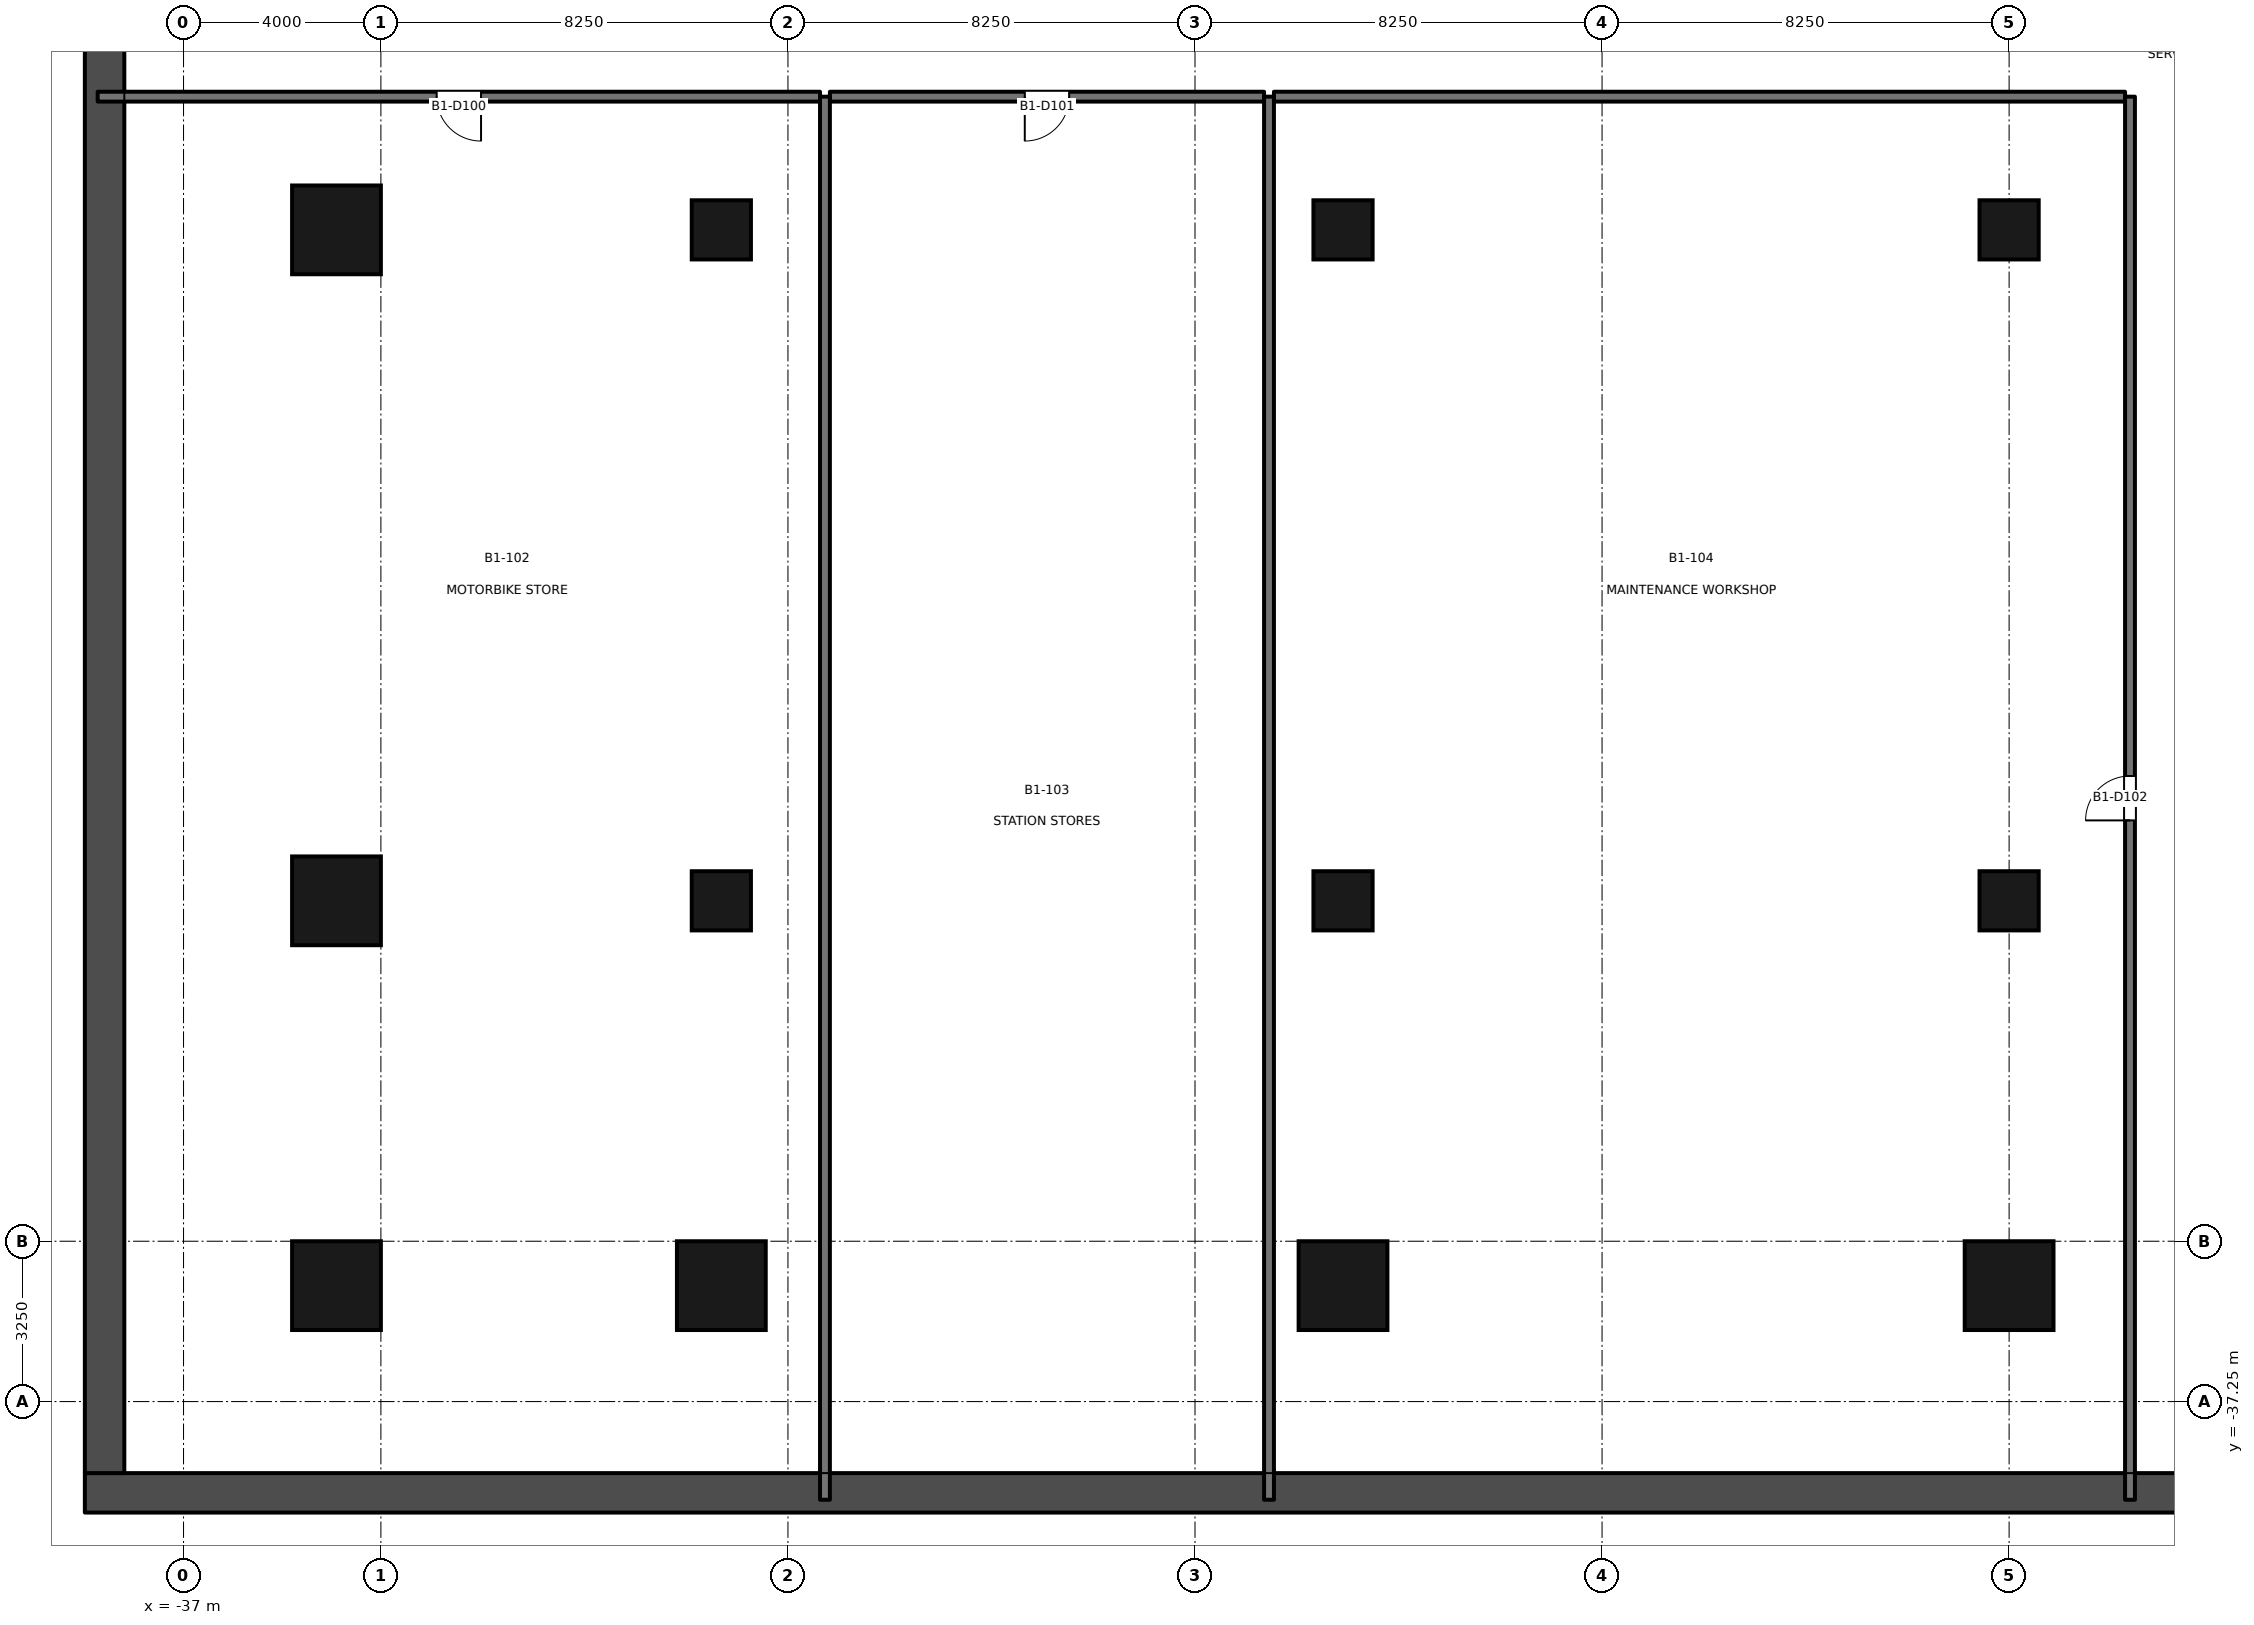
"""IFC4 building model, lengths in metres.
Left out: names, types, materials, properties, quantities, classifications, styles, units other than length and angle.
Written with IfcOpenShell. Run it as: python <this file> out.ifc"""

import sys

from ifc_helpers import new_model, si_unit, direction, frame, frame_2d, origin, origin_2d, place, context, subcontext, project, spatial, rectangle, extrude, element, fill, save


model = new_model("IFC4")
c1 = context("Model", 3, precision=1e-05, world=origin(), true_north=direction((0.0, 1.0)))
c2 = subcontext(c1, "Body", "Model", "MODEL_VIEW")
j1 = project(units=[si_unit("LENGTHUNIT", "METRE"), si_unit("PLANEANGLEUNIT", "RADIAN")], contexts=[c1])
p1 = place(None, origin())
s1 = spatial("IfcSite", under=j1, at=p1, CompositionType="ELEMENT")
p2 = place(p1, origin())
s2 = spatial("IfcBuilding", under=s1, at=p2, CompositionType="ELEMENT")
p3 = place(p2, frame((0.0, 0.0, -5.5)))
s3 = spatial("IfcBuildingStorey", under=s2, at=p3, CompositionType="ELEMENT", Elevation=-5.5)
p4 = place(p3, frame((-39.0, -39.1, -0.2), z_axis=(0.0, 0.0, 1.0), x_axis=(1.0, 0.0, 0.0)))
e1 = element("IfcWall", 1, at=p4, inside=s3, PredefinedType="SOLIDWALL", context=c2, shape_type="SweptSolid", body=[
    extrude(rectangle(XDim=78.0, YDim=0.8, at=frame_2d((39.0, 0.0))), origin(), (0.0, 0.0, 1.0), 5.5),
])
p5 = place(p3, frame((-38.6, -38.7, -0.2), z_axis=(0.0, 0.0, 1.0), x_axis=(0.0, 1.0, 0.0)))
e2 = element("IfcWall", 2, at=p5, inside=s3, PredefinedType="SOLIDWALL", context=c2, shape_type="SweptSolid", body=[
    extrude(rectangle(XDim=51.9, YDim=0.8, at=frame_2d((25.95, 0.0))), origin(), (0.0, 0.0, 1.0), 5.5),
])
for number, where, z_axis, x_axis in (
    (3, (-33.9, -34.9, -0.2), (0.0, 0.0, 1.0), (1.0, 0.0, 0.0)),
    (4, (-26.1, -34.9, -0.2), (0.0, 0.0, 1.0), (1.0, 0.0, 0.0)),
    (5, (-13.5, -34.9, -0.2), (0.0, 0.0, 1.0), (1.0, 0.0, 0.0)),
    (6, (0.0, -34.9, -0.2), (0.0, 0.0, 1.0), (1.0, 0.0, 0.0)),
    (7, (-33.9, -27.1, -0.2), (0.0, 0.0, 1.0), (0.0, 1.0, 0.0)),
    (8, (-33.9, -13.5, -0.2), (0.0, 0.0, 1.0), (0.0, 1.0, 0.0)),
):
    element("IfcColumn", number, at=place(p3, frame(where, z_axis=z_axis, x_axis=x_axis)), inside=s3, PredefinedType="COLUMN", context=c2, shape_type="SweptSolid", body=[
        extrude(rectangle(XDim=1.8, YDim=1.8, at=origin_2d()), origin(), (0.0, 0.0, 1.0), 5.5),
    ])
for number, where, z_axis, x_axis in (
    (9, (-26.1, -27.1, -0.2), (0.0, 0.0, 1.0), (1.0, 0.0, 0.0)),
    (10, (-13.5, -27.1, -0.2), (0.0, 0.0, 1.0), (1.0, 0.0, 0.0)),
    (11, (0.0, -27.1, -0.2), (0.0, 0.0, 1.0), (1.0, 0.0, 0.0)),
    (12, (-26.1, -13.5, -0.2), (0.0, 0.0, 1.0), (1.0, 0.0, 0.0)),
    (13, (-13.5, -13.5, -0.2), (0.0, 0.0, 1.0), (1.0, 0.0, 0.0)),
    (14, (0.0, -13.5, -0.2), (0.0, 0.0, 1.0), (1.0, 0.0, 0.0)),
):
    element("IfcColumn", number, at=place(p3, frame(where, z_axis=z_axis, x_axis=x_axis)), inside=s3, PredefinedType="COLUMN", context=c2, shape_type="SweptSolid", body=[
        extrude(rectangle(XDim=1.2, YDim=1.2, at=origin_2d()), origin(), (0.0, 0.0, 1.0), 5.5),
    ])
p6 = place(p3, frame((-24.1, -10.8, 0.0), z_axis=(0.0, 0.0, 1.0), x_axis=(-1.0, 0.0, 0.0)))
e15 = element("IfcWall", 15, at=p6, inside=s3, PredefinedType="PARTITIONING", context=c2, shape_type="SweptSolid", body=[
    extrude(rectangle(XDim=14.64, YDim=0.2, at=frame_2d((7.32, 0.0))), origin(), (0.0, 0.0, 1.0), 4.1),
])
p7 = place(p6, frame((6.87, 0.0, 0.0)))
e16 = element("IfcOpeningElement", 16, at=p7, cuts=e15, PredefinedType="OPENING", context=c2, shape_type="SweptSolid", body=[
    extrude(rectangle(XDim=0.9, YDim=2.1, at=frame_2d((0.45, 1.05))), frame((0.0, 0.111, 0.0), z_axis=(0.0, -1.0, 0.0), x_axis=(1.0, 0.0, 0.0)), (0.0, 0.0, 1.0), 0.221),
])
p8 = place(p3, frame((-15.1, -10.8, 0.0), z_axis=(0.0, 0.0, 1.0), x_axis=(-1.0, 0.0, 0.0)))
e17 = element("IfcWall", 17, at=p8, inside=s3, PredefinedType="PARTITIONING", context=c2, shape_type="SweptSolid", body=[
    extrude(rectangle(XDim=8.8, YDim=0.2, at=frame_2d((4.4, 0.0))), origin(), (0.0, 0.0, 1.0), 5.0),
])
p9 = place(p8, frame((3.95, 0.0, 0.0)))
e18 = element("IfcOpeningElement", 18, at=p9, cuts=e17, PredefinedType="OPENING", context=c2, shape_type="SweptSolid", body=[
    extrude(rectangle(XDim=0.9, YDim=2.1, at=frame_2d((0.45, 1.05))), frame((0.0, 0.111, 0.0), z_axis=(0.0, -1.0, 0.0), x_axis=(1.0, 0.0, 0.0)), (0.0, 0.0, 1.0), 0.221),
])
p10 = place(p3, frame((2.35, -10.8, 0.0), z_axis=(0.0, 0.0, 1.0), x_axis=(-1.0, 0.0, 0.0)))
e19 = element("IfcWall", 19, at=p10, inside=s3, PredefinedType="PARTITIONING", context=c2, shape_type="SweptSolid", body=[
    extrude(rectangle(XDim=17.25, YDim=0.2, at=frame_2d((8.625, 0.0))), origin(), (0.0, 0.0, 1.0), 3.9),
])
p11 = place(p3, frame((2.45, -39.24, 0.0), z_axis=(0.0, 0.0, 1.0), x_axis=(0.0, 1.0, 0.0)))
e20 = element("IfcWall", 20, at=p11, inside=s3, PredefinedType="PARTITIONING", context=c2, shape_type="SweptSolid", body=[
    extrude(rectangle(XDim=28.44, YDim=0.2, at=frame_2d((14.22, 0.0))), origin(), (0.0, 0.0, 1.0), 4.3),
])
p12 = place(p11, frame((13.77, 0.0, 0.0)))
e21 = element("IfcOpeningElement", 21, at=p12, cuts=e20, PredefinedType="OPENING", context=c2, shape_type="SweptSolid", body=[
    extrude(rectangle(XDim=0.9, YDim=2.1, at=frame_2d((0.45, 1.05))), frame((0.0, 0.111, 0.0), z_axis=(0.0, -1.0, 0.0), x_axis=(1.0, 0.0, 0.0)), (0.0, 0.0, 1.0), 0.221),
])
for number, where, z_axis, x_axis in (
    (22, (-24.0, -10.8, 0.0), (0.0, 0.0, 1.0), (0.0, -1.0, 0.0)),
    (23, (-15.0, -10.8, 0.0), (0.0, 0.0, 1.0), (0.0, -1.0, 0.0)),
):
    element("IfcWall", number, at=place(p3, frame(where, z_axis=z_axis, x_axis=x_axis)), inside=s3, PredefinedType="PARTITIONING", context=c2, shape_type="SweptSolid", body=[
        extrude(rectangle(XDim=28.44, YDim=0.2, at=frame_2d((14.22, 0.0))), origin(), (0.0, 0.0, 1.0), 4.3),
    ])
p13 = place(p7, origin())
e24 = element("IfcDoor", 24, at=p13, inside=s3, OperationType="SINGLE_SWING_LEFT", PredefinedType="DOOR", context=c2, shape_type="SweptSolid", body=[
    extrude(rectangle(XDim=0.9, YDim=2.1, at=frame_2d((0.45, 1.05))), frame((0.0, 0.025, 0.0), z_axis=(0.0, -1.0, 0.0), x_axis=(1.0, 0.0, 0.0)), (0.0, 0.0, 1.0), 0.05),
])
fill(e16, e24)
p14 = place(p9, origin())
e25 = element("IfcDoor", 25, at=p14, inside=s3, OperationType="SINGLE_SWING_RIGHT", PredefinedType="DOOR", context=c2, shape_type="SweptSolid", body=[
    extrude(rectangle(XDim=0.9, YDim=2.1, at=frame_2d((0.45, 1.05))), frame((0.0, 0.025, 0.0), z_axis=(0.0, -1.0, 0.0), x_axis=(1.0, 0.0, 0.0)), (0.0, 0.0, 1.0), 0.05),
])
fill(e18, e25)
p15 = place(p12, origin())
e26 = element("IfcDoor", 26, at=p15, inside=s3, OperationType="SINGLE_SWING_LEFT", PredefinedType="DOOR", context=c2, shape_type="SweptSolid", body=[
    extrude(rectangle(XDim=0.9, YDim=2.1, at=frame_2d((0.45, 1.05))), frame((0.0, 0.025, 0.0), z_axis=(0.0, -1.0, 0.0), x_axis=(1.0, 0.0, 0.0)), (0.0, 0.0, 1.0), 0.05),
])
fill(e21, e26)
save(model, sys.argv[1])
